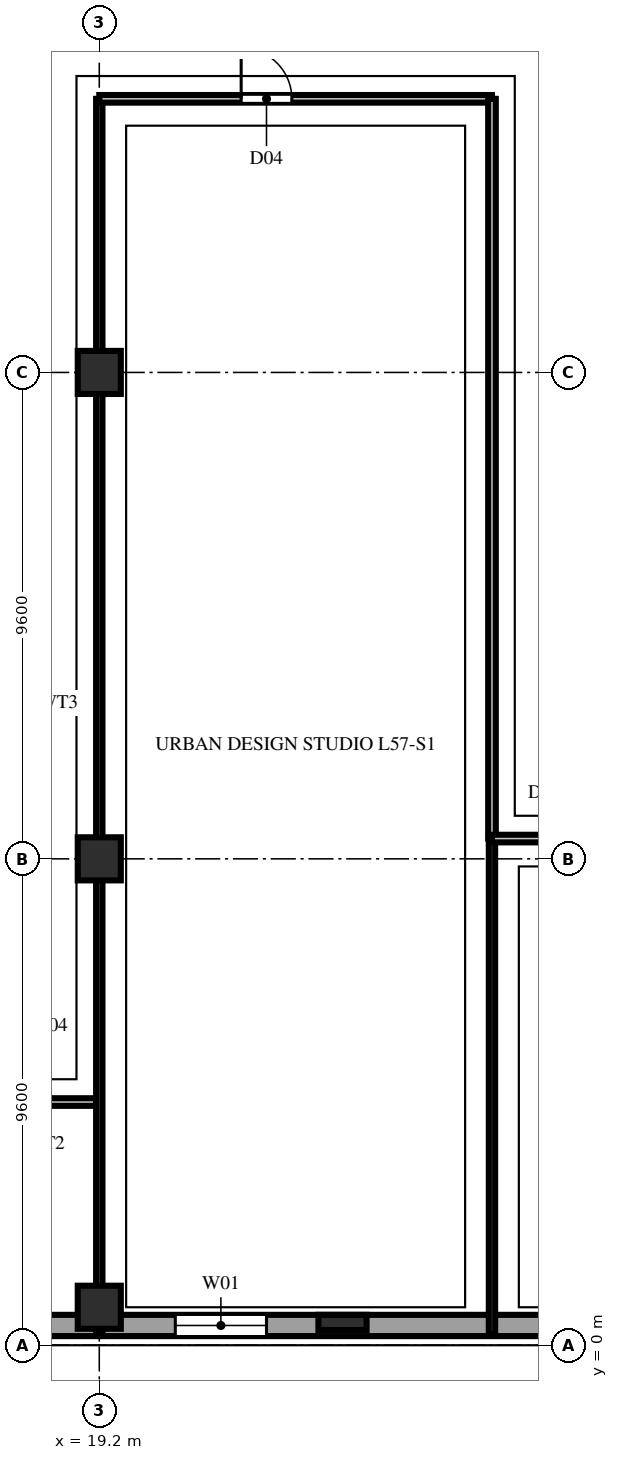
"""IFC4 building model, lengths in metres.
Left out: names, types, materials, properties, quantities, classifications, styles, units other than length and angle.
Written with IfcOpenShell. Run it as: python <this file> out.ifc"""

import sys

from ifc_helpers import new_model, si_unit, direction, frame, frame_2d, origin, origin_2d, place, context, subcontext, project, spatial, rectangle, extrude, element, fill, save


model = new_model("IFC4")
c1 = context("Model", 3, precision=1e-05, world=origin(), true_north=direction((0.0, 1.0)))
c2 = subcontext(c1, "Body", "Model", "MODEL_VIEW")
j1 = project(units=[si_unit("LENGTHUNIT", "METRE"), si_unit("PLANEANGLEUNIT", "RADIAN")], contexts=[c1])
p1 = place(None, origin())
s1 = spatial("IfcSite", under=j1, at=p1, CompositionType="ELEMENT")
p2 = place(p1, origin())
s2 = spatial("IfcBuilding", under=s1, at=p2, CompositionType="ELEMENT")
p3 = place(p2, frame((0.0, 0.0, 225.6)))
s3 = spatial("IfcBuildingStorey", under=s2, at=p3, CompositionType="ELEMENT", Elevation=225.6)
for number, where, z_axis, x_axis in (
    (1, (19.2, 0.75, 0.0), (0.0, 0.0, 1.0), (1.0, 0.0, 0.0)),
    (2, (19.2, 9.6, 0.0), (0.0, 0.0, 1.0), (1.0, 0.0, 0.0)),
    (3, (19.2, 19.2, 0.0), (0.0, 0.0, 1.0), (1.0, 0.0, 0.0)),
):
    element("IfcColumn", number, at=place(p3, frame(where, z_axis=z_axis, x_axis=x_axis)), inside=s3, PredefinedType="COLUMN", context=c2, shape_type="SweptSolid", body=[
        extrude(rectangle(XDim=0.85, YDim=0.85, at=origin_2d()), origin(), (0.0, 0.0, 1.0), 3.8),
    ])
p4 = place(p3, frame((24.0, 0.45, 0.0), z_axis=(0.0, 0.0, 1.0), x_axis=(1.0, 0.0, 0.0)))
e4 = element("IfcColumn", 4, at=p4, inside=s3, PredefinedType="PILASTER", context=c2, shape_type="SweptSolid", body=[
    extrude(rectangle(XDim=0.95, YDim=0.3, at=origin_2d()), origin(), (0.0, 0.0, 1.0), 3.8),
])
p5 = place(p3, frame((1.84, 0.39, 0.0), z_axis=(0.0, 0.0, 1.0), x_axis=(1.0, 0.0, 0.0)))
e5 = element("IfcWall", 5, at=p5, inside=s3, PredefinedType="SOLIDWALL", context=c2, shape_type="SweptSolid", body=[
    extrude(rectangle(XDim=53.92, YDim=0.42, at=frame_2d((26.96, 0.0))), origin(), (0.0, 0.0, 1.0), 3.54),
])
p6 = place(p5, frame((4.46, 0.0, 0.85)))
e6 = element("IfcOpeningElement", 6, at=p6, cuts=e5, PredefinedType="OPENING", context=c2, shape_type="SweptSolid", body=[
    extrude(rectangle(XDim=1.8, YDim=1.85, at=frame_2d((0.9, 0.925))), frame((0.0, 0.222, 0.0), z_axis=(0.0, -1.0, 0.0), x_axis=(1.0, 0.0, 0.0)), (0.0, 0.0, 1.0), 0.444),
])
p7 = place(p5, frame((9.26, 0.0, 0.85)))
e7 = element("IfcOpeningElement", 7, at=p7, cuts=e5, PredefinedType="OPENING", context=c2, shape_type="SweptSolid", body=[
    extrude(rectangle(XDim=1.8, YDim=1.85, at=frame_2d((0.9, 0.925))), frame((0.0, 0.222, 0.0), z_axis=(0.0, -1.0, 0.0), x_axis=(1.0, 0.0, 0.0)), (0.0, 0.0, 1.0), 0.444),
])
p8 = place(p5, frame((18.86, 0.0, 0.85)))
e8 = element("IfcOpeningElement", 8, at=p8, cuts=e5, PredefinedType="OPENING", context=c2, shape_type="SweptSolid", body=[
    extrude(rectangle(XDim=1.8, YDim=1.85, at=frame_2d((0.9, 0.925))), frame((0.0, 0.222, 0.0), z_axis=(0.0, -1.0, 0.0), x_axis=(1.0, 0.0, 0.0)), (0.0, 0.0, 1.0), 0.444),
])
p9 = place(p5, frame((28.46, 0.0, 0.85)))
e9 = element("IfcOpeningElement", 9, at=p9, cuts=e5, PredefinedType="OPENING", context=c2, shape_type="SweptSolid", body=[
    extrude(rectangle(XDim=1.8, YDim=1.85, at=frame_2d((0.9, 0.925))), frame((0.0, 0.222, 0.0), z_axis=(0.0, -1.0, 0.0), x_axis=(1.0, 0.0, 0.0)), (0.0, 0.0, 1.0), 0.444),
])
p10 = place(p5, frame((33.26, 0.0, 0.85)))
e10 = element("IfcOpeningElement", 10, at=p10, cuts=e5, PredefinedType="OPENING", context=c2, shape_type="SweptSolid", body=[
    extrude(rectangle(XDim=1.8, YDim=1.85, at=frame_2d((0.9, 0.925))), frame((0.0, 0.222, 0.0), z_axis=(0.0, -1.0, 0.0), x_axis=(1.0, 0.0, 0.0)), (0.0, 0.0, 1.0), 0.444),
])
p11 = place(p5, frame((38.06, 0.0, 0.85)))
e11 = element("IfcOpeningElement", 11, at=p11, cuts=e5, PredefinedType="OPENING", context=c2, shape_type="SweptSolid", body=[
    extrude(rectangle(XDim=1.8, YDim=1.85, at=frame_2d((0.9, 0.925))), frame((0.0, 0.222, 0.0), z_axis=(0.0, -1.0, 0.0), x_axis=(1.0, 0.0, 0.0)), (0.0, 0.0, 1.0), 0.444),
])
p12 = place(p5, frame((42.86, 0.0, 0.85)))
e12 = element("IfcOpeningElement", 12, at=p12, cuts=e5, PredefinedType="OPENING", context=c2, shape_type="SweptSolid", body=[
    extrude(rectangle(XDim=1.8, YDim=1.85, at=frame_2d((0.9, 0.925))), frame((0.0, 0.222, 0.0), z_axis=(0.0, -1.0, 0.0), x_axis=(1.0, 0.0, 0.0)), (0.0, 0.0, 1.0), 0.444),
])
p13 = place(p5, frame((47.66, 0.0, 0.85)))
e13 = element("IfcOpeningElement", 13, at=p13, cuts=e5, PredefinedType="OPENING", context=c2, shape_type="SweptSolid", body=[
    extrude(rectangle(XDim=1.8, YDim=1.85, at=frame_2d((0.9, 0.925))), frame((0.0, 0.222, 0.0), z_axis=(0.0, -1.0, 0.0), x_axis=(1.0, 0.0, 0.0)), (0.0, 0.0, 1.0), 0.444),
])
p14 = place(p3, frame((17.05, 4.8, 0.0), z_axis=(0.0, 0.0, 1.0), x_axis=(1.0, 0.0, 0.0)))
e14 = element("IfcWall", 14, at=p14, inside=s3, PredefinedType="PARTITIONING", context=c2, shape_type="SweptSolid", body=[
    extrude(rectangle(XDim=2.15, YDim=0.15, at=frame_2d((1.075, 0.0))), origin(), (0.0, 0.0, 1.0), 3.54),
])
p15 = place(p3, frame((19.2, 0.22, 0.0), z_axis=(0.0, 0.0, 1.0), x_axis=(0.0, 1.0, 0.0)))
e15 = element("IfcWall", 15, at=p15, inside=s3, PredefinedType="PARTITIONING", context=c2, shape_type="SweptSolid", body=[
    extrude(rectangle(XDim=0.53, YDim=0.125, at=frame_2d((0.265, 0.0))), origin(), (0.0, 0.0, 1.0), 3.54),
])
p16 = place(p3, frame((19.2, 0.75, 0.0), z_axis=(0.0, 0.0, 1.0), x_axis=(0.0, 1.0, 0.0)))
e16 = element("IfcWall", 16, at=p16, inside=s3, PredefinedType="PARTITIONING", context=c2, shape_type="SweptSolid", body=[
    extrude(rectangle(XDim=23.85, YDim=0.125, at=frame_2d((11.925, 0.0))), origin(), (0.0, 0.0, 1.0), 2.923),
])
p17 = place(p3, frame((19.2, 24.6, 0.0), z_axis=(0.0, 0.0, 1.0), x_axis=(1.0, 0.0, 0.0)))
e17 = element("IfcWall", 17, at=p17, inside=s3, PredefinedType="PARTITIONING", context=c2, shape_type="SweptSolid", body=[
    extrude(rectangle(XDim=7.75, YDim=0.15, at=frame_2d((3.875, 0.0))), origin(), (0.0, 0.0, 1.0), 3.54),
])
p18 = place(p17, frame((2.8, 0.0, 0.0)))
e18 = element("IfcOpeningElement", 18, at=p18, cuts=e17, PredefinedType="OPENING", context=c2, shape_type="SweptSolid", body=[
    extrude(rectangle(XDim=1.0, YDim=2.2, at=frame_2d((0.5, 1.1))), frame((0.0, 0.087, 0.0), z_axis=(0.0, -1.0, 0.0), x_axis=(1.0, 0.0, 0.0)), (0.0, 0.0, 1.0), 0.174),
])
p19 = place(p3, frame((26.95, 0.22, 0.0), z_axis=(0.0, 0.0, 1.0), x_axis=(0.0, 1.0, 0.0)))
e19 = element("IfcWall", 19, at=p19, inside=s3, PredefinedType="PARTITIONING", context=c2, shape_type="SweptSolid", body=[
    extrude(rectangle(XDim=9.78, YDim=0.125, at=frame_2d((4.89, 0.0))), origin(), (0.0, 0.0, 1.0), 3.54),
])
p20 = place(p3, frame((26.95, 10.0, 0.0), z_axis=(0.0, 0.0, 1.0), x_axis=(0.0, 1.0, 0.0)))
e20 = element("IfcWall", 20, at=p20, inside=s3, PredefinedType="PARTITIONING", context=c2, shape_type="SweptSolid", body=[
    extrude(rectangle(XDim=14.6, YDim=0.15, at=frame_2d((7.3, 0.0))), origin(), (0.0, 0.0, 1.0), 3.54),
])
p21 = place(p3, frame((26.95, 10.0, 0.0), z_axis=(0.0, 0.0, 1.0), x_axis=(1.0, 0.0, 0.0)))
e21 = element("IfcWall", 21, at=p21, inside=s3, PredefinedType="PARTITIONING", context=c2, shape_type="SweptSolid", body=[
    extrude(rectangle(XDim=2.63, YDim=0.15, at=frame_2d((1.315, 0.0))), origin(), (0.0, 0.0, 1.0), 3.54),
])
p22 = place(p8, origin())
e22 = element("IfcWindow", 22, at=p22, inside=s3, PartitioningType="DOUBLE_PANEL_VERTICAL", PredefinedType="WINDOW", context=c2, shape_type="SweptSolid", body=[
    extrude(rectangle(XDim=1.8, YDim=1.85, at=frame_2d((0.9, 0.925))), frame((0.0, 0.11, 0.0), z_axis=(0.0, -1.0, 0.0), x_axis=(1.0, 0.0, 0.0)), (0.0, 0.0, 1.0), 0.06),
])
fill(e8, e22)
p23 = place(p18, origin())
e23 = element("IfcDoor", 23, at=p23, inside=s3, OperationType="SINGLE_SWING_LEFT", PredefinedType="DOOR", context=c2, shape_type="SweptSolid", body=[
    extrude(rectangle(XDim=1.0, YDim=2.2, at=frame_2d((0.5, 1.1))), frame((0.0, 0.025, 0.0), z_axis=(0.0, -1.0, 0.0), x_axis=(1.0, 0.0, 0.0)), (0.0, 0.0, 1.0), 0.05),
])
fill(e18, e23)
save(model, sys.argv[1])
